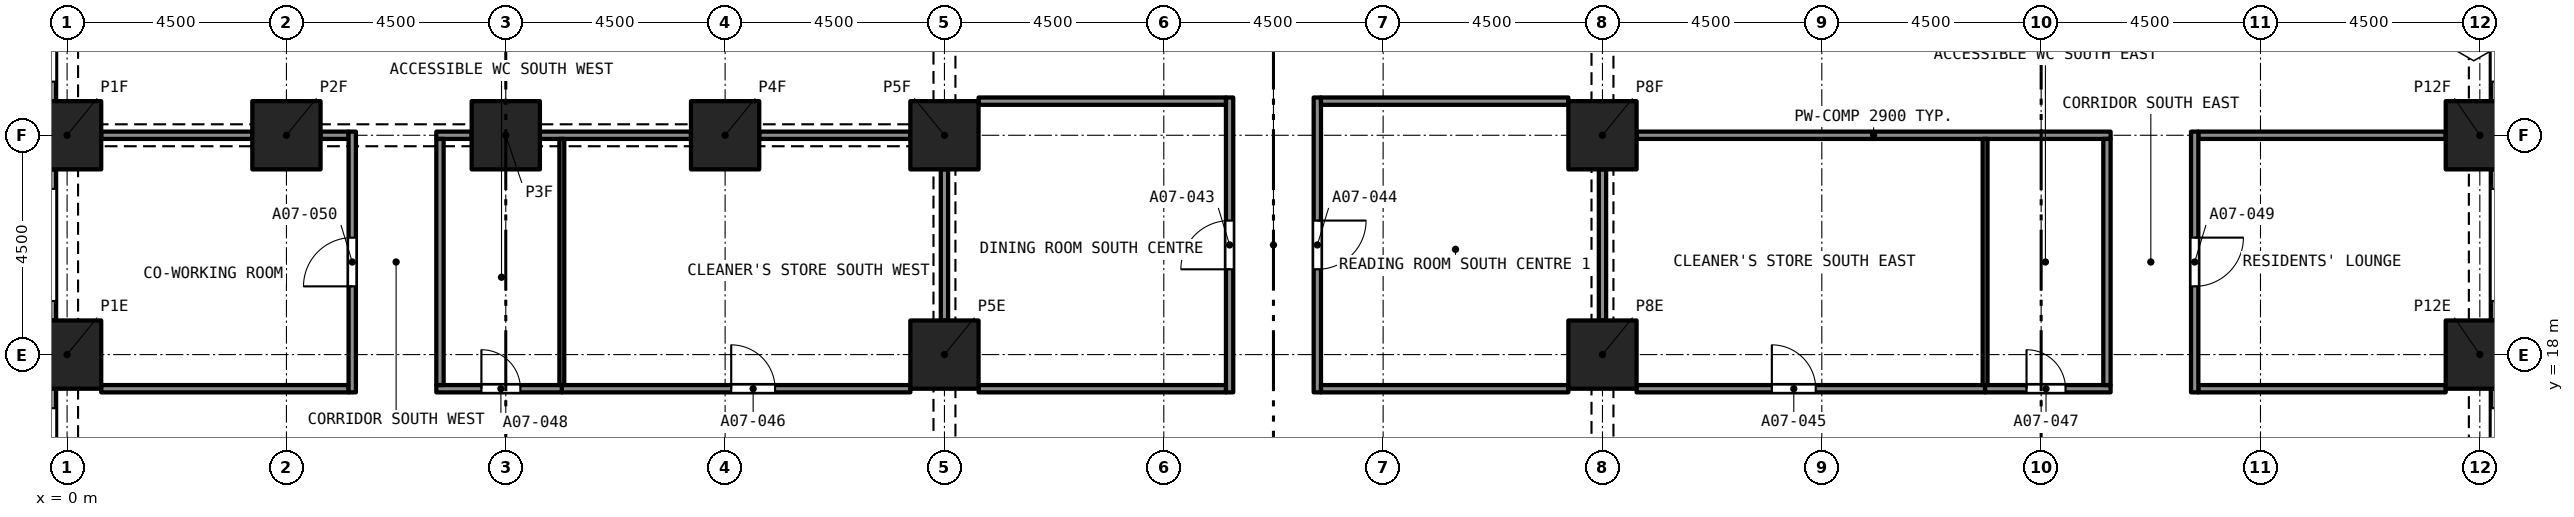
"""IFC4 building model, lengths in metres.
Left out: names, types, materials, properties, quantities, classifications, styles, units other than length and angle.
Written with IfcOpenShell. Run it as: python <this file> out.ifc"""

import sys

from ifc_helpers import new_model, si_unit, direction, frame, frame_2d, origin, origin_2d, place, context, subcontext, project, spatial, rectangle, extrude, element, fill, save


model = new_model("IFC4")
c1 = context("Model", 3, precision=1e-05, world=origin(), true_north=direction((0.0, 1.0)))
c2 = subcontext(c1, "Body", "Model", "MODEL_VIEW")
j1 = project(units=[si_unit("LENGTHUNIT", "METRE"), si_unit("PLANEANGLEUNIT", "RADIAN")], contexts=[c1])
p1 = place(None, origin())
s1 = spatial("IfcSite", under=j1, at=p1, CompositionType="ELEMENT")
p2 = place(p1, origin())
s2 = spatial("IfcBuilding", under=s1, at=p2, CompositionType="ELEMENT")
p3 = place(p2, frame((0.0, 0.0, 33.6)))
s3 = spatial("IfcBuildingStorey", under=s2, at=p3, CompositionType="ELEMENT", Elevation=33.6)
for number, where, z_axis, x_axis in (
    (1, (0.0, 18.0, 0.0), (0.0, 0.0, 1.0), (1.0, 0.0, 0.0)),
    (2, (18.0, 18.0, 0.0), (0.0, 0.0, 1.0), (1.0, 0.0, 0.0)),
    (3, (31.5, 18.0, 0.0), (0.0, 0.0, 1.0), (1.0, 0.0, 0.0)),
    (4, (49.5, 18.0, 0.0), (0.0, 0.0, 1.0), (1.0, 0.0, 0.0)),
    (5, (0.0, 22.5, 0.0), (0.0, 0.0, 1.0), (1.0, 0.0, 0.0)),
    (6, (4.5, 22.5, 0.0), (0.0, 0.0, 1.0), (1.0, 0.0, 0.0)),
    (7, (9.0, 22.5, 0.0), (0.0, 0.0, 1.0), (1.0, 0.0, 0.0)),
    (8, (13.5, 22.5, 0.0), (0.0, 0.0, 1.0), (1.0, 0.0, 0.0)),
    (9, (18.0, 22.5, 0.0), (0.0, 0.0, 1.0), (1.0, 0.0, 0.0)),
    (10, (31.5, 22.5, 0.0), (0.0, 0.0, 1.0), (1.0, 0.0, 0.0)),
    (11, (49.5, 22.5, 0.0), (0.0, 0.0, 1.0), (1.0, 0.0, 0.0)),
):
    element("IfcColumn", number, at=place(p3, frame(where, z_axis=z_axis, x_axis=x_axis)), inside=s3, PredefinedType="COLUMN", context=c2, shape_type="SweptSolid", body=[
        extrude(rectangle(XDim=1.4, YDim=1.4, at=origin_2d()), origin(), (0.0, 0.0, 1.0), 3.2),
    ])
p4 = place(p3, frame((49.875, 17.3, 0.0), z_axis=(0.0, 0.0, 1.0), x_axis=(0.0, -1.0, 0.0)))
e12 = element("IfcWall", 12, at=p4, inside=s3, PredefinedType="SOLIDWALL", context=c2, shape_type="SweptSolid", body=[
    extrude(rectangle(XDim=3.1, YDim=0.3, at=frame_2d((1.55, 0.0))), origin(), (0.0, 0.0, 1.0), 3.2),
])
p5 = place(p4, frame((0.4, 0.0, 0.45)))
e13 = element("IfcOpeningElement", 13, at=p5, cuts=e12, PredefinedType="OPENING", context=c2, shape_type="SweptSolid", body=[
    extrude(rectangle(XDim=2.3, YDim=1.95, at=frame_2d((1.15, 0.975))), frame((0.0, 0.16, 0.0), z_axis=(0.0, -1.0, 0.0), x_axis=(1.0, 0.0, 0.0)), (0.0, 0.0, 1.0), 0.32),
])
p6 = place(p3, frame((49.875, 21.8, 0.0), z_axis=(0.0, 0.0, 1.0), x_axis=(0.0, -1.0, 0.0)))
e14 = element("IfcWall", 14, at=p6, inside=s3, PredefinedType="SOLIDWALL", context=c2, shape_type="SweptSolid", body=[
    extrude(rectangle(XDim=3.1, YDim=0.3, at=frame_2d((1.55, 0.0))), origin(), (0.0, 0.0, 1.0), 3.2),
])
p7 = place(p6, frame((0.4, 0.0, 0.45)))
e15 = element("IfcOpeningElement", 15, at=p7, cuts=e14, PredefinedType="OPENING", context=c2, shape_type="SweptSolid", body=[
    extrude(rectangle(XDim=2.3, YDim=1.95, at=frame_2d((1.15, 0.975))), frame((0.0, 0.16, 0.0), z_axis=(0.0, -1.0, 0.0), x_axis=(1.0, 0.0, 0.0)), (0.0, 0.0, 1.0), 0.32),
])
p8 = place(p3, frame((49.875, 26.3, 0.0), z_axis=(0.0, 0.0, 1.0), x_axis=(0.0, -1.0, 0.0)))
e16 = element("IfcWall", 16, at=p8, inside=s3, PredefinedType="SOLIDWALL", context=c2, shape_type="SweptSolid", body=[
    extrude(rectangle(XDim=3.1, YDim=0.3, at=frame_2d((1.55, 0.0))), origin(), (0.0, 0.0, 1.0), 3.2),
])
p9 = place(p8, frame((0.4, 0.0, 0.45)))
e17 = element("IfcOpeningElement", 17, at=p9, cuts=e16, PredefinedType="OPENING", context=c2, shape_type="SweptSolid", body=[
    extrude(rectangle(XDim=2.3, YDim=1.95, at=frame_2d((1.15, 0.975))), frame((0.0, 0.16, 0.0), z_axis=(0.0, -1.0, 0.0), x_axis=(1.0, 0.0, 0.0)), (0.0, 0.0, 1.0), 0.32),
])
p10 = place(p3, frame((-0.375, 23.2, 0.0), z_axis=(0.0, 0.0, 1.0), x_axis=(0.0, 1.0, 0.0)))
e18 = element("IfcWall", 18, at=p10, inside=s3, PredefinedType="SOLIDWALL", context=c2, shape_type="SweptSolid", body=[
    extrude(rectangle(XDim=3.1, YDim=0.3, at=frame_2d((1.55, 0.0))), origin(), (0.0, 0.0, 1.0), 3.2),
])
p11 = place(p10, frame((0.4, 0.0, 0.45)))
e19 = element("IfcOpeningElement", 19, at=p11, cuts=e18, PredefinedType="OPENING", context=c2, shape_type="SweptSolid", body=[
    extrude(rectangle(XDim=2.3, YDim=1.95, at=frame_2d((1.15, 0.975))), frame((0.0, 0.16, 0.0), z_axis=(0.0, -1.0, 0.0), x_axis=(1.0, 0.0, 0.0)), (0.0, 0.0, 1.0), 0.32),
])
p12 = place(p3, frame((-0.375, 18.7, 0.0), z_axis=(0.0, 0.0, 1.0), x_axis=(0.0, 1.0, 0.0)))
e20 = element("IfcWall", 20, at=p12, inside=s3, PredefinedType="SOLIDWALL", context=c2, shape_type="SweptSolid", body=[
    extrude(rectangle(XDim=3.1, YDim=0.3, at=frame_2d((1.55, 0.0))), origin(), (0.0, 0.0, 1.0), 3.2),
])
p13 = place(p12, frame((0.4, 0.0, 0.45)))
e21 = element("IfcOpeningElement", 21, at=p13, cuts=e20, PredefinedType="OPENING", context=c2, shape_type="SweptSolid", body=[
    extrude(rectangle(XDim=2.3, YDim=1.95, at=frame_2d((1.15, 0.975))), frame((0.0, 0.16, 0.0), z_axis=(0.0, -1.0, 0.0), x_axis=(1.0, 0.0, 0.0)), (0.0, 0.0, 1.0), 0.32),
])
p14 = place(p3, frame((-0.375, 14.2, 0.0), z_axis=(0.0, 0.0, 1.0), x_axis=(0.0, 1.0, 0.0)))
e22 = element("IfcWall", 22, at=p14, inside=s3, PredefinedType="SOLIDWALL", context=c2, shape_type="SweptSolid", body=[
    extrude(rectangle(XDim=3.1, YDim=0.3, at=frame_2d((1.55, 0.0))), origin(), (0.0, 0.0, 1.0), 3.2),
])
p15 = place(p14, frame((0.4, 0.0, 0.45)))
e23 = element("IfcOpeningElement", 23, at=p15, cuts=e22, PredefinedType="OPENING", context=c2, shape_type="SweptSolid", body=[
    extrude(rectangle(XDim=2.3, YDim=1.95, at=frame_2d((1.15, 0.975))), frame((0.0, 0.16, 0.0), z_axis=(0.0, -1.0, 0.0), x_axis=(1.0, 0.0, 0.0)), (0.0, 0.0, 1.0), 0.32),
])
p16 = place(p3, frame((23.85, 17.225, 0.0), z_axis=(0.0, 0.0, 1.0), x_axis=(0.0, 1.0, 0.0)))
e24 = element("IfcWall", 24, at=p16, inside=s3, PredefinedType="PARTITIONING", context=c2, shape_type="SweptSolid", body=[
    extrude(rectangle(XDim=6.05, YDim=0.15, at=frame_2d((3.025, 0.0))), origin(), (0.0, 0.0, 1.0), 2.75),
])
p17 = place(p16, frame((2.525, 0.0, 0.0)))
e25 = element("IfcOpeningElement", 25, at=p17, cuts=e24, PredefinedType="OPENING", context=c2, shape_type="SweptSolid", body=[
    extrude(rectangle(XDim=1.0, YDim=2.1, at=frame_2d((0.5, 1.05))), frame((0.0, 0.085, 0.0), z_axis=(0.0, -1.0, 0.0), x_axis=(1.0, 0.0, 0.0)), (0.0, 0.0, 1.0), 0.17),
])
p18 = place(p3, frame((25.65, 23.275, 0.0), z_axis=(0.0, 0.0, 1.0), x_axis=(0.0, -1.0, 0.0)))
e26 = element("IfcWall", 26, at=p18, inside=s3, PredefinedType="PARTITIONING", context=c2, shape_type="SweptSolid", body=[
    extrude(rectangle(XDim=6.05, YDim=0.15, at=frame_2d((3.025, 0.0))), origin(), (0.0, 0.0, 1.0), 2.75),
])
p19 = place(p18, frame((2.525, 0.0, 0.0)))
e27 = element("IfcOpeningElement", 27, at=p19, cuts=e26, PredefinedType="OPENING", context=c2, shape_type="SweptSolid", body=[
    extrude(rectangle(XDim=1.0, YDim=2.1, at=frame_2d((0.5, 1.05))), frame((0.0, 0.085, 0.0), z_axis=(0.0, -1.0, 0.0), x_axis=(1.0, 0.0, 0.0)), (0.0, 0.0, 1.0), 0.17),
])
for number, where, z_axis, x_axis in (
    (28, (18.7, 17.3, 0.0), (0.0, 0.0, 1.0), (1.0, 0.0, 0.0)),
    (29, (25.725, 17.3, 0.0), (0.0, 0.0, 1.0), (1.0, 0.0, 0.0)),
):
    element("IfcWall", number, at=place(p3, frame(where, z_axis=z_axis, x_axis=x_axis)), inside=s3, PredefinedType="PARTITIONING", context=c2, shape_type="SweptSolid", body=[
        extrude(rectangle(XDim=5.075, YDim=0.15, at=frame_2d((2.538, 0.0))), origin(), (0.0, 0.0, 1.0), 2.75),
    ])
p20 = place(p3, frame((32.2, 17.3, 0.0), z_axis=(0.0, 0.0, 1.0), x_axis=(1.0, 0.0, 0.0)))
e30 = element("IfcWall", 30, at=p20, inside=s3, PredefinedType="PARTITIONING", context=c2, shape_type="SweptSolid", body=[
    extrude(rectangle(XDim=7.15, YDim=0.15, at=frame_2d((3.575, 0.0))), origin(), (0.0, 0.0, 1.0), 2.9),
])
p21 = place(p20, frame((2.775, 0.0, 0.0)))
e31 = element("IfcOpeningElement", 31, at=p21, cuts=e30, PredefinedType="OPENING", context=c2, shape_type="SweptSolid", body=[
    extrude(rectangle(XDim=0.9, YDim=2.1, at=frame_2d((0.45, 1.05))), frame((0.0, 0.085, 0.0), z_axis=(0.0, -1.0, 0.0), x_axis=(1.0, 0.0, 0.0)), (0.0, 0.0, 1.0), 0.17),
])
p22 = place(p3, frame((10.15, 17.3, 0.0), z_axis=(0.0, 0.0, 1.0), x_axis=(1.0, 0.0, 0.0)))
e32 = element("IfcWall", 32, at=p22, inside=s3, PredefinedType="PARTITIONING", context=c2, shape_type="SweptSolid", body=[
    extrude(rectangle(XDim=7.15, YDim=0.15, at=frame_2d((3.575, 0.0))), origin(), (0.0, 0.0, 1.0), 2.9),
])
p23 = place(p22, frame((3.475, 0.0, 0.0)))
e33 = element("IfcOpeningElement", 33, at=p23, cuts=e32, PredefinedType="OPENING", context=c2, shape_type="SweptSolid", body=[
    extrude(rectangle(XDim=0.9, YDim=2.1, at=frame_2d((0.45, 1.05))), frame((0.0, 0.085, 0.0), z_axis=(0.0, -1.0, 0.0), x_axis=(1.0, 0.0, 0.0)), (0.0, 0.0, 1.0), 0.17),
])
p24 = place(p3, frame((39.35, 17.3, 0.0), z_axis=(0.0, 0.0, 1.0), x_axis=(1.0, 0.0, 0.0)))
e34 = element("IfcWall", 34, at=p24, inside=s3, PredefinedType="PARTITIONING", context=c2, shape_type="SweptSolid", body=[
    extrude(rectangle(XDim=2.575, YDim=0.15, at=frame_2d((1.288, 0.0))), origin(), (0.0, 0.0, 1.0), 2.9),
])
p25 = place(p24, frame((0.85, 0.0, 0.0)))
e35 = element("IfcOpeningElement", 35, at=p25, cuts=e34, PredefinedType="OPENING", context=c2, shape_type="SweptSolid", body=[
    extrude(rectangle(XDim=0.8, YDim=2.1, at=frame_2d((0.4, 1.05))), frame((0.0, 0.085, 0.0), z_axis=(0.0, -1.0, 0.0), x_axis=(1.0, 0.0, 0.0)), (0.0, 0.0, 1.0), 0.17),
])
p26 = place(p3, frame((7.575, 17.3, 0.0), z_axis=(0.0, 0.0, 1.0), x_axis=(1.0, 0.0, 0.0)))
e36 = element("IfcWall", 36, at=p26, inside=s3, PredefinedType="PARTITIONING", context=c2, shape_type="SweptSolid", body=[
    extrude(rectangle(XDim=2.575, YDim=0.15, at=frame_2d((1.288, 0.0))), origin(), (0.0, 0.0, 1.0), 2.9),
])
p27 = place(p26, frame((0.925, 0.0, 0.0)))
e37 = element("IfcOpeningElement", 37, at=p27, cuts=e36, PredefinedType="OPENING", context=c2, shape_type="SweptSolid", body=[
    extrude(rectangle(XDim=0.8, YDim=2.1, at=frame_2d((0.4, 1.05))), frame((0.0, 0.085, 0.0), z_axis=(0.0, -1.0, 0.0), x_axis=(1.0, 0.0, 0.0)), (0.0, 0.0, 1.0), 0.17),
])
for number, where, z_axis, x_axis in (
    (38, (43.725, 17.3, 0.0), (0.0, 0.0, 1.0), (1.0, 0.0, 0.0)),
    (39, (0.7, 17.3, 0.0), (0.0, 0.0, 1.0), (1.0, 0.0, 0.0)),
):
    element("IfcWall", number, at=place(p3, frame(where, z_axis=z_axis, x_axis=x_axis)), inside=s3, PredefinedType="PARTITIONING", context=c2, shape_type="SweptSolid", body=[
        extrude(rectangle(XDim=5.075, YDim=0.15, at=frame_2d((2.538, 0.0))), origin(), (0.0, 0.0, 1.0), 2.9),
    ])
p28 = place(p3, frame((18.7, 23.2, 0.0), z_axis=(0.0, 0.0, 1.0), x_axis=(1.0, 0.0, 0.0)))
e40 = element("IfcWall", 40, at=p28, inside=s3, PredefinedType="PARTITIONING", context=c2, shape_type="SweptSolid", body=[
    extrude(rectangle(XDim=5.075, YDim=0.15, at=frame_2d((2.538, 0.0))), origin(), (0.0, 0.0, 1.0), 2.75),
])
p29 = place(p3, frame((18.0, 18.7, 0.0), z_axis=(0.0, 0.0, 1.0), x_axis=(0.0, 1.0, 0.0)))
e41 = element("IfcWall", 41, at=p29, inside=s3, PredefinedType="PARTITIONING", context=c2, shape_type="SweptSolid", body=[
    extrude(rectangle(XDim=3.1, YDim=0.15, at=frame_2d((1.55, 0.0))), origin(), (0.0, 0.0, 1.0), 2.38),
])
p30 = place(p3, frame((25.725, 23.2, 0.0), z_axis=(0.0, 0.0, 1.0), x_axis=(1.0, 0.0, 0.0)))
e42 = element("IfcWall", 42, at=p30, inside=s3, PredefinedType="PARTITIONING", context=c2, shape_type="SweptSolid", body=[
    extrude(rectangle(XDim=5.075, YDim=0.15, at=frame_2d((2.538, 0.0))), origin(), (0.0, 0.0, 1.0), 2.75),
])
p31 = place(p3, frame((31.5, 18.7, 0.0), z_axis=(0.0, 0.0, 1.0), x_axis=(0.0, 1.0, 0.0)))
e43 = element("IfcWall", 43, at=p31, inside=s3, PredefinedType="PARTITIONING", context=c2, shape_type="SweptSolid", body=[
    extrude(rectangle(XDim=3.1, YDim=0.15, at=frame_2d((1.55, 0.0))), origin(), (0.0, 0.0, 1.0), 2.38),
])
p32 = place(p3, frame((32.2, 22.5, 0.0), z_axis=(0.0, 0.0, 1.0), x_axis=(1.0, 0.0, 0.0)))
e44 = element("IfcWall", 44, at=p32, inside=s3, PredefinedType="PARTITIONING", context=c2, shape_type="SweptSolid", body=[
    extrude(rectangle(XDim=9.725, YDim=0.15, at=frame_2d((4.863, 0.0))), origin(), (0.0, 0.0, 1.0), 2.9),
])
p33 = place(p3, frame((43.725, 22.5, 0.0), z_axis=(0.0, 0.0, 1.0), x_axis=(1.0, 0.0, 0.0)))
e45 = element("IfcWall", 45, at=p33, inside=s3, PredefinedType="PARTITIONING", context=c2, shape_type="SweptSolid", body=[
    extrude(rectangle(XDim=5.075, YDim=0.15, at=frame_2d((2.538, 0.0))), origin(), (0.0, 0.0, 1.0), 2.9),
])
for number, where, z_axis, x_axis in (
    (46, (14.2, 22.5, 0.0), (0.0, 0.0, 1.0), (1.0, 0.0, 0.0)),
    (47, (9.7, 22.5, 0.0), (0.0, 0.0, 1.0), (1.0, 0.0, 0.0)),
):
    element("IfcWall", number, at=place(p3, frame(where, z_axis=z_axis, x_axis=x_axis)), inside=s3, PredefinedType="PARTITIONING", context=c2, shape_type="SweptSolid", body=[
        extrude(rectangle(XDim=3.1, YDim=0.15, at=frame_2d((1.55, 0.0))), origin(), (0.0, 0.0, 1.0), 2.38),
    ])
p34 = place(p3, frame((7.575, 22.5, 0.0), z_axis=(0.0, 0.0, 1.0), x_axis=(1.0, 0.0, 0.0)))
e48 = element("IfcWall", 48, at=p34, inside=s3, PredefinedType="PARTITIONING", context=c2, shape_type="SweptSolid", body=[
    extrude(rectangle(XDim=0.725, YDim=0.15, at=frame_2d((0.363, 0.0))), origin(), (0.0, 0.0, 1.0), 2.38),
])
p35 = place(p3, frame((5.2, 22.5, 0.0), z_axis=(0.0, 0.0, 1.0), x_axis=(1.0, 0.0, 0.0)))
e49 = element("IfcWall", 49, at=p35, inside=s3, PredefinedType="PARTITIONING", context=c2, shape_type="SweptSolid", body=[
    extrude(rectangle(XDim=0.575, YDim=0.15, at=frame_2d((0.288, 0.0))), origin(), (0.0, 0.0, 1.0), 2.38),
])
p36 = place(p3, frame((0.7, 22.5, 0.0), z_axis=(0.0, 0.0, 1.0), x_axis=(1.0, 0.0, 0.0)))
e50 = element("IfcWall", 50, at=p36, inside=s3, PredefinedType="PARTITIONING", context=c2, shape_type="SweptSolid", body=[
    extrude(rectangle(XDim=3.1, YDim=0.15, at=frame_2d((1.55, 0.0))), origin(), (0.0, 0.0, 1.0), 2.38),
])
p37 = place(p3, frame((41.85, 17.375, 0.0), z_axis=(0.0, 0.0, 1.0), x_axis=(0.0, 1.0, 0.0)))
e51 = element("IfcWall", 51, at=p37, inside=s3, PredefinedType="PARTITIONING", context=c2, shape_type="SweptSolid", body=[
    extrude(rectangle(XDim=5.05, YDim=0.15, at=frame_2d((2.525, 0.0))), origin(), (0.0, 0.0, 1.0), 2.9),
])
p38 = place(p3, frame((43.65, 22.575, 0.0), z_axis=(0.0, 0.0, 1.0), x_axis=(0.0, -1.0, 0.0)))
e52 = element("IfcWall", 52, at=p38, inside=s3, PredefinedType="PARTITIONING", context=c2, shape_type="SweptSolid", body=[
    extrude(rectangle(XDim=5.35, YDim=0.15, at=frame_2d((2.675, 0.0))), origin(), (0.0, 0.0, 1.0), 2.9),
])
p39 = place(p38, frame((2.175, 0.0, 0.0)))
e53 = element("IfcOpeningElement", 53, at=p39, cuts=e52, PredefinedType="OPENING", context=c2, shape_type="SweptSolid", body=[
    extrude(rectangle(XDim=1.0, YDim=2.1, at=frame_2d((0.5, 1.05))), frame((0.0, 0.085, 0.0), z_axis=(0.0, -1.0, 0.0), x_axis=(1.0, 0.0, 0.0)), (0.0, 0.0, 1.0), 0.17),
])
p40 = place(p3, frame((7.65, 17.375, 0.0), z_axis=(0.0, 0.0, 1.0), x_axis=(0.0, 1.0, 0.0)))
e54 = element("IfcWall", 54, at=p40, inside=s3, PredefinedType="PARTITIONING", context=c2, shape_type="SweptSolid", body=[
    extrude(rectangle(XDim=5.05, YDim=0.15, at=frame_2d((2.525, 0.0))), origin(), (0.0, 0.0, 1.0), 2.9),
])
p41 = place(p3, frame((5.85, 17.225, 0.0), z_axis=(0.0, 0.0, 1.0), x_axis=(0.0, 1.0, 0.0)))
e55 = element("IfcWall", 55, at=p41, inside=s3, PredefinedType="PARTITIONING", context=c2, shape_type="SweptSolid", body=[
    extrude(rectangle(XDim=5.35, YDim=0.15, at=frame_2d((2.675, 0.0))), origin(), (0.0, 0.0, 1.0), 2.9),
])
p42 = place(p41, frame((2.175, 0.0, 0.0)))
e56 = element("IfcOpeningElement", 56, at=p42, cuts=e55, PredefinedType="OPENING", context=c2, shape_type="SweptSolid", body=[
    extrude(rectangle(XDim=1.0, YDim=2.1, at=frame_2d((0.5, 1.05))), frame((0.0, 0.085, 0.0), z_axis=(0.0, -1.0, 0.0), x_axis=(1.0, 0.0, 0.0)), (0.0, 0.0, 1.0), 0.17),
])
for number, where, z_axis, x_axis in (
    (57, (39.35, 17.375, 0.0), (0.0, 0.0, 1.0), (0.0, 1.0, 0.0)),
    (58, (10.15, 17.375, 0.0), (0.0, 0.0, 1.0), (0.0, 1.0, 0.0)),
):
    element("IfcWall", number, at=place(p3, frame(where, z_axis=z_axis, x_axis=x_axis)), inside=s3, PredefinedType="PARTITIONING", context=c2, shape_type="SweptSolid", body=[
        extrude(rectangle(XDim=5.05, YDim=0.1, at=frame_2d((2.525, 0.0))), origin(), (0.0, 0.0, 1.0), 2.9),
    ])
p43 = place(p17, origin())
e59 = element("IfcDoor", 59, at=p43, inside=s3, OperationType="SINGLE_SWING_RIGHT", PredefinedType="DOOR", context=c2, shape_type="SweptSolid", body=[
    extrude(rectangle(XDim=1.0, YDim=2.1, at=frame_2d((0.5, 1.05))), frame((0.0, 0.025, 0.0), z_axis=(0.0, -1.0, 0.0), x_axis=(1.0, 0.0, 0.0)), (0.0, 0.0, 1.0), 0.05),
])
fill(e25, e59)
p44 = place(p19, origin())
e60 = element("IfcDoor", 60, at=p44, inside=s3, OperationType="SINGLE_SWING_RIGHT", PredefinedType="DOOR", context=c2, shape_type="SweptSolid", body=[
    extrude(rectangle(XDim=1.0, YDim=2.1, at=frame_2d((0.5, 1.05))), frame((0.0, 0.025, 0.0), z_axis=(0.0, -1.0, 0.0), x_axis=(1.0, 0.0, 0.0)), (0.0, 0.0, 1.0), 0.05),
])
fill(e27, e60)
p45 = place(p21, origin())
e61 = element("IfcDoor", 61, at=p45, inside=s3, OperationType="SINGLE_SWING_LEFT", PredefinedType="DOOR", context=c2, shape_type="SweptSolid", body=[
    extrude(rectangle(XDim=0.9, YDim=2.1, at=frame_2d((0.45, 1.05))), frame((0.0, 0.025, 0.0), z_axis=(0.0, -1.0, 0.0), x_axis=(1.0, 0.0, 0.0)), (0.0, 0.0, 1.0), 0.05),
])
fill(e31, e61)
p46 = place(p23, origin())
e62 = element("IfcDoor", 62, at=p46, inside=s3, OperationType="SINGLE_SWING_RIGHT", PredefinedType="DOOR", context=c2, shape_type="SweptSolid", body=[
    extrude(rectangle(XDim=0.9, YDim=2.1, at=frame_2d((0.45, 1.05))), frame((0.0, 0.025, 0.0), z_axis=(0.0, -1.0, 0.0), x_axis=(1.0, 0.0, 0.0)), (0.0, 0.0, 1.0), 0.05),
])
fill(e33, e62)
p47 = place(p25, origin())
e63 = element("IfcDoor", 63, at=p47, inside=s3, OperationType="SINGLE_SWING_LEFT", PredefinedType="DOOR", context=c2, shape_type="SweptSolid", body=[
    extrude(rectangle(XDim=0.8, YDim=2.1, at=frame_2d((0.4, 1.05))), frame((0.0, 0.025, 0.0), z_axis=(0.0, -1.0, 0.0), x_axis=(1.0, 0.0, 0.0)), (0.0, 0.0, 1.0), 0.05),
])
fill(e35, e63)
p48 = place(p27, origin())
e64 = element("IfcDoor", 64, at=p48, inside=s3, OperationType="SINGLE_SWING_RIGHT", PredefinedType="DOOR", context=c2, shape_type="SweptSolid", body=[
    extrude(rectangle(XDim=0.8, YDim=2.1, at=frame_2d((0.4, 1.05))), frame((0.0, 0.025, 0.0), z_axis=(0.0, -1.0, 0.0), x_axis=(1.0, 0.0, 0.0)), (0.0, 0.0, 1.0), 0.05),
])
fill(e37, e64)
p49 = place(p39, origin())
e65 = element("IfcDoor", 65, at=p49, inside=s3, OperationType="SINGLE_SWING_RIGHT", PredefinedType="DOOR", context=c2, shape_type="SweptSolid", body=[
    extrude(rectangle(XDim=1.0, YDim=2.1, at=frame_2d((0.5, 1.05))), frame((0.0, 0.025, 0.0), z_axis=(0.0, -1.0, 0.0), x_axis=(1.0, 0.0, 0.0)), (0.0, 0.0, 1.0), 0.05),
])
fill(e53, e65)
p50 = place(p42, origin())
e66 = element("IfcDoor", 66, at=p50, inside=s3, OperationType="SINGLE_SWING_LEFT", PredefinedType="DOOR", context=c2, shape_type="SweptSolid", body=[
    extrude(rectangle(XDim=1.0, YDim=2.1, at=frame_2d((0.5, 1.05))), frame((0.0, 0.025, 0.0), z_axis=(0.0, -1.0, 0.0), x_axis=(1.0, 0.0, 0.0)), (0.0, 0.0, 1.0), 0.05),
])
fill(e56, e66)
save(model, sys.argv[1])
